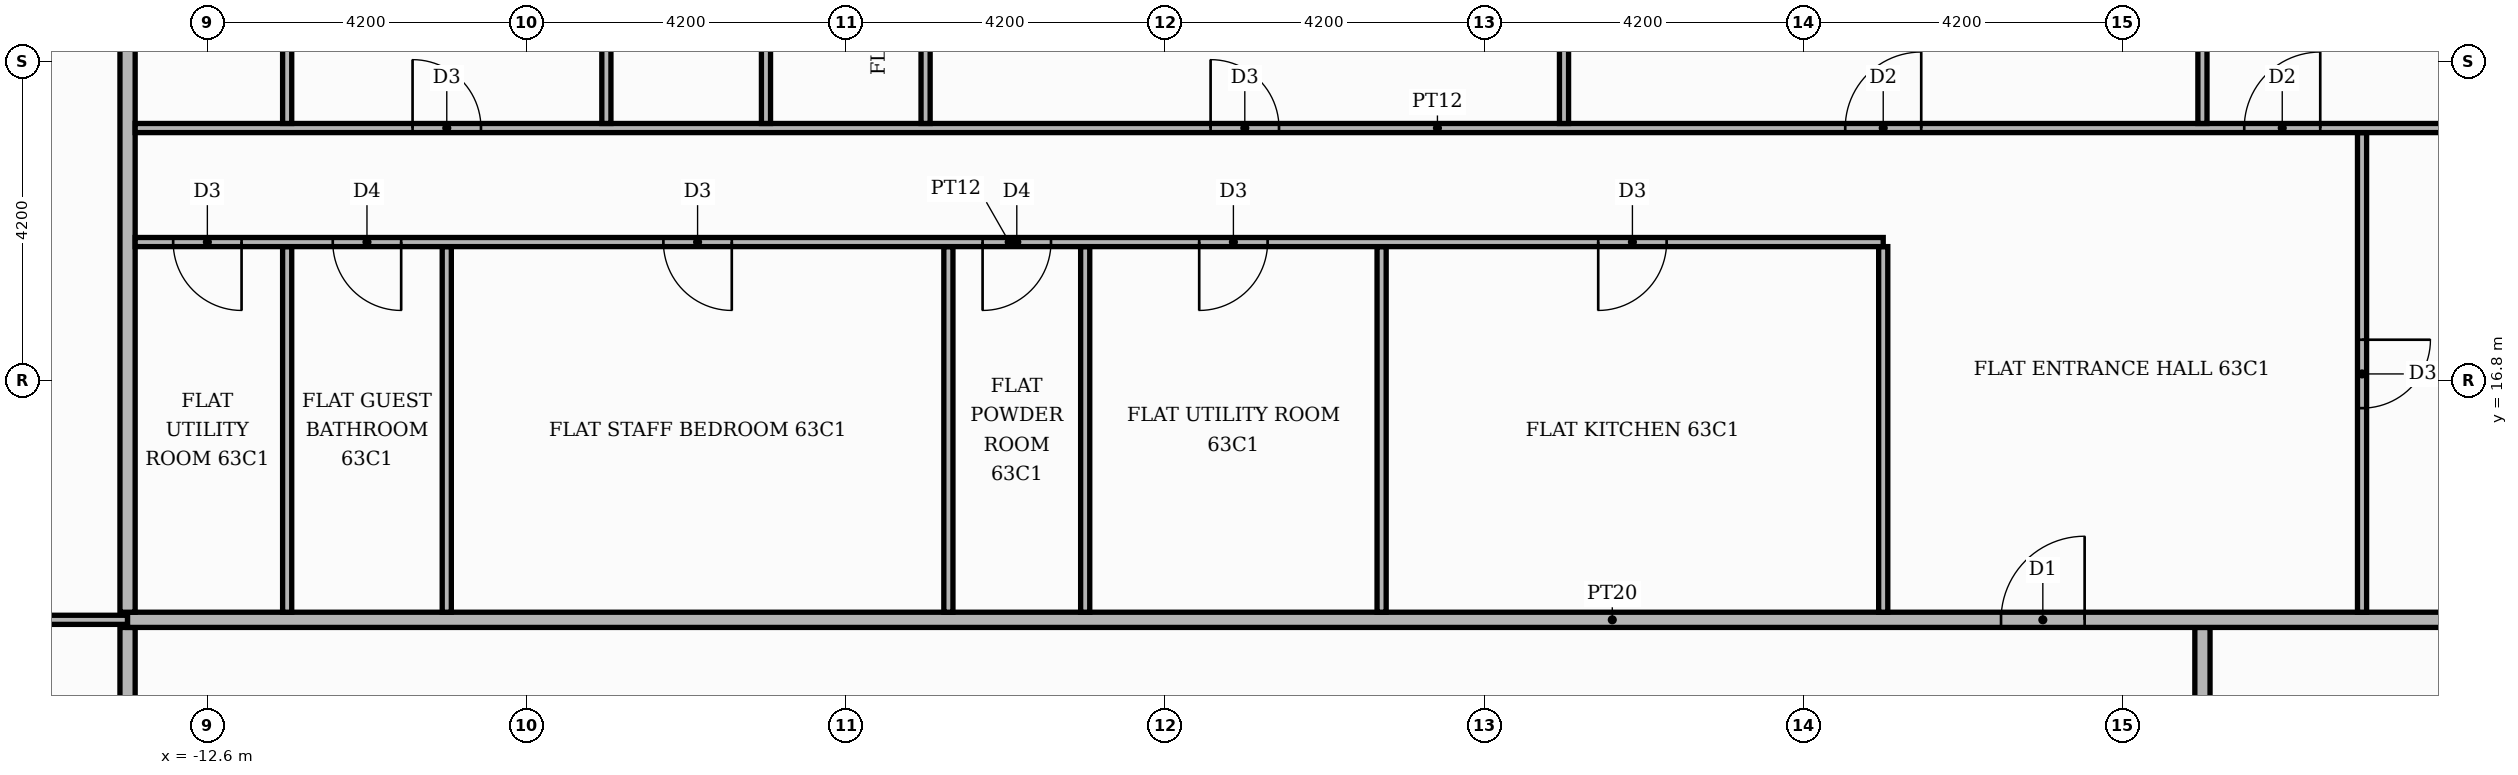
"""IFC4 building model, lengths in metres.
Left out: names, types, materials, properties, quantities, classifications, styles, units other than length and angle.
Written with IfcOpenShell. Run it as: python <this file> out.ifc"""

import sys

from ifc_helpers import new_model, si_unit, direction, frame, frame_2d, origin, place, context, subcontext, project, spatial, rectangle, extrude, element, fill, save


model = new_model("IFC4")
c1 = context("Model", 3, precision=1e-05, world=origin(), true_north=direction((0.0, 1.0)))
c2 = subcontext(c1, "Body", "Model", "MODEL_VIEW")
j1 = project(units=[si_unit("LENGTHUNIT", "METRE"), si_unit("PLANEANGLEUNIT", "RADIAN")], contexts=[c1])
p1 = place(None, origin())
s1 = spatial("IfcSite", under=j1, at=p1, CompositionType="ELEMENT")
p2 = place(p1, origin())
s2 = spatial("IfcBuilding", under=s1, at=p2, CompositionType="ELEMENT")
p3 = place(p2, frame((0.0, 0.0, 264.0)))
s3 = spatial("IfcBuildingStorey", under=s2, at=p3, CompositionType="ELEMENT", Elevation=264.0)
for number, where, z_axis, x_axis in (
    (1, (-13.65, 11.1, 0.0), (0.0, 0.0, 1.0), (0.0, 1.0, 0.0)),
    (2, (13.65, 11.1, 0.0), (0.0, 0.0, 1.0), (0.0, 1.0, 0.0)),
):
    element("IfcWall", number, at=place(p3, frame(where, z_axis=z_axis, x_axis=x_axis)), inside=s3, PredefinedType="PARTITIONING", context=c2, shape_type="SweptSolid", body=[
        extrude(rectangle(XDim=2.45, YDim=0.2, at=frame_2d((1.225, 0.0))), origin(), (0.0, 0.0, 1.0), 3.48),
    ])
p4 = place(p3, frame((-20.42, 13.65, 0.0), z_axis=(0.0, 0.0, 1.0), x_axis=(1.0, 0.0, 0.0)))
e3 = element("IfcWall", 3, at=p4, inside=s3, PredefinedType="PARTITIONING", context=c2, shape_type="SweptSolid", body=[
    extrude(rectangle(XDim=6.77, YDim=0.12, at=frame_2d((3.385, 0.0))), origin(), (0.0, 0.0, 1.0), 3.48),
])
p5 = place(p4, frame((2.885, 0.0, 0.0)))
e4 = element("IfcOpeningElement", 4, at=p5, cuts=e3, PredefinedType="OPENING", context=c2, shape_type="SweptSolid", body=[
    extrude(rectangle(XDim=1.0, YDim=2.1, at=frame_2d((0.5, 1.05))), frame((0.0, 0.07, 0.0), z_axis=(0.0, -1.0, 0.0), x_axis=(1.0, 0.0, 0.0)), (0.0, 0.0, 1.0), 0.14),
])
p6 = place(p3, frame((-13.65, 13.65, 0.0), z_axis=(0.0, 0.0, 1.0), x_axis=(1.0, 0.0, 0.0)))
e5 = element("IfcWall", 5, at=p6, inside=s3, PredefinedType="PARTITIONING", context=c2, shape_type="SweptSolid", body=[
    extrude(rectangle(XDim=39.07, YDim=0.2, at=frame_2d((19.535, 0.0))), origin(), (0.0, 0.0, 1.0), 3.48),
])
p7 = place(p6, frame((24.65, 0.0, 0.0)))
e6 = element("IfcOpeningElement", 6, at=p7, cuts=e5, PredefinedType="OPENING", context=c2, shape_type="SweptSolid", body=[
    extrude(rectangle(XDim=1.1, YDim=2.4, at=frame_2d((0.55, 1.2))), frame((0.0, 0.11, 0.0), z_axis=(0.0, -1.0, 0.0), x_axis=(1.0, 0.0, 0.0)), (0.0, 0.0, 1.0), 0.22),
])
p8 = place(p3, frame((-13.65, 13.75, 0.0), z_axis=(0.0, 0.0, 1.0), x_axis=(0.0, 1.0, 0.0)))
e7 = element("IfcWall", 7, at=p8, inside=s3, PredefinedType="PARTITIONING", context=c2, shape_type="SweptSolid", body=[
    extrude(rectangle(XDim=11.67, YDim=0.2, at=frame_2d((5.835, 0.0))), origin(), (0.0, 0.0, 1.0), 3.48),
])
for number, where, z_axis, x_axis in (
    (8, (-11.55, 13.75, 0.0), (0.0, 0.0, 1.0), (0.0, 1.0, 0.0)),
    (9, (-9.45, 13.75, 0.0), (0.0, 0.0, 1.0), (0.0, 1.0, 0.0)),
    (10, (-2.85, 13.75, 0.0), (0.0, 0.0, 1.0), (0.0, 1.0, 0.0)),
    (11, (-1.05, 13.75, 0.0), (0.0, 0.0, 1.0), (0.0, 1.0, 0.0)),
    (12, (2.85, 13.75, 0.0), (0.0, 0.0, 1.0), (0.0, 1.0, 0.0)),
    (13, (9.45, 13.75, 0.0), (0.0, 0.0, 1.0), (0.0, 1.0, 0.0)),
):
    element("IfcWall", number, at=place(p3, frame(where, z_axis=z_axis, x_axis=x_axis)), inside=s3, PredefinedType="PARTITIONING", context=c2, shape_type="SweptSolid", body=[
        extrude(rectangle(XDim=4.81, YDim=0.12, at=frame_2d((2.405, 0.0))), origin(), (0.0, 0.0, 1.0), 3.48),
    ])
p9 = place(p3, frame((15.75, 13.75, 0.0), z_axis=(0.0, 0.0, 1.0), x_axis=(0.0, 1.0, 0.0)))
e14 = element("IfcWall", 14, at=p9, inside=s3, PredefinedType="PARTITIONING", context=c2, shape_type="SweptSolid", body=[
    extrude(rectangle(XDim=6.31, YDim=0.12, at=frame_2d((3.155, 0.0))), origin(), (0.0, 0.0, 1.0), 3.48),
])
p10 = place(p9, frame((2.685, 0.0, 0.0)))
e15 = element("IfcOpeningElement", 15, at=p10, cuts=e14, PredefinedType="OPENING", context=c2, shape_type="SweptSolid", body=[
    extrude(rectangle(XDim=0.9, YDim=2.1, at=frame_2d((0.45, 1.05))), frame((0.0, 0.07, 0.0), z_axis=(0.0, -1.0, 0.0), x_axis=(1.0, 0.0, 0.0)), (0.0, 0.0, 1.0), 0.14),
])
p11 = place(p3, frame((-13.55, 18.62, 0.0), z_axis=(0.0, 0.0, 1.0), x_axis=(1.0, 0.0, 0.0)))
e16 = element("IfcWall", 16, at=p11, inside=s3, PredefinedType="PARTITIONING", context=c2, shape_type="SweptSolid", body=[
    extrude(rectangle(XDim=23.0, YDim=0.12, at=frame_2d((11.5, 0.0))), origin(), (0.0, 0.0, 1.0), 3.48),
])
p12 = place(p11, frame((19.25, 0.0, 0.0)))
e17 = element("IfcOpeningElement", 17, at=p12, cuts=e16, PredefinedType="OPENING", context=c2, shape_type="SweptSolid", body=[
    extrude(rectangle(XDim=0.9, YDim=2.1, at=frame_2d((0.45, 1.05))), frame((0.0, 0.07, 0.0), z_axis=(0.0, -1.0, 0.0), x_axis=(1.0, 0.0, 0.0)), (0.0, 0.0, 1.0), 0.14),
])
p13 = place(p11, frame((14.0, 0.0, 0.0)))
e18 = element("IfcOpeningElement", 18, at=p13, cuts=e16, PredefinedType="OPENING", context=c2, shape_type="SweptSolid", body=[
    extrude(rectangle(XDim=0.9, YDim=2.1, at=frame_2d((0.45, 1.05))), frame((0.0, 0.07, 0.0), z_axis=(0.0, -1.0, 0.0), x_axis=(1.0, 0.0, 0.0)), (0.0, 0.0, 1.0), 0.14),
])
p14 = place(p11, frame((11.15, 0.0, 0.0)))
e19 = element("IfcOpeningElement", 19, at=p14, cuts=e16, PredefinedType="OPENING", context=c2, shape_type="SweptSolid", body=[
    extrude(rectangle(XDim=0.9, YDim=2.1, at=frame_2d((0.45, 1.05))), frame((0.0, 0.07, 0.0), z_axis=(0.0, -1.0, 0.0), x_axis=(1.0, 0.0, 0.0)), (0.0, 0.0, 1.0), 0.14),
])
p15 = place(p11, frame((6.95, 0.0, 0.0)))
e20 = element("IfcOpeningElement", 20, at=p15, cuts=e16, PredefinedType="OPENING", context=c2, shape_type="SweptSolid", body=[
    extrude(rectangle(XDim=0.9, YDim=2.1, at=frame_2d((0.45, 1.05))), frame((0.0, 0.07, 0.0), z_axis=(0.0, -1.0, 0.0), x_axis=(1.0, 0.0, 0.0)), (0.0, 0.0, 1.0), 0.14),
])
p16 = place(p11, frame((2.6, 0.0, 0.0)))
e21 = element("IfcOpeningElement", 21, at=p16, cuts=e16, PredefinedType="OPENING", context=c2, shape_type="SweptSolid", body=[
    extrude(rectangle(XDim=0.9, YDim=2.1, at=frame_2d((0.45, 1.05))), frame((0.0, 0.07, 0.0), z_axis=(0.0, -1.0, 0.0), x_axis=(1.0, 0.0, 0.0)), (0.0, 0.0, 1.0), 0.14),
])
p17 = place(p11, frame((0.5, 0.0, 0.0)))
e22 = element("IfcOpeningElement", 22, at=p17, cuts=e16, PredefinedType="OPENING", context=c2, shape_type="SweptSolid", body=[
    extrude(rectangle(XDim=0.9, YDim=2.1, at=frame_2d((0.45, 1.05))), frame((0.0, 0.07, 0.0), z_axis=(0.0, -1.0, 0.0), x_axis=(1.0, 0.0, 0.0)), (0.0, 0.0, 1.0), 0.14),
])
p18 = place(p3, frame((-13.55, 20.12, 0.0), z_axis=(0.0, 0.0, 1.0), x_axis=(1.0, 0.0, 0.0)))
e23 = element("IfcWall", 23, at=p18, inside=s3, PredefinedType="PARTITIONING", context=c2, shape_type="SweptSolid", body=[
    extrude(rectangle(XDim=34.269, YDim=0.12, at=frame_2d((17.135, 0.0))), origin(), (0.0, 0.0, 1.0), 3.48),
])
p19 = place(p18, frame((27.75, 0.0, 0.0)))
e24 = element("IfcOpeningElement", 24, at=p19, cuts=e23, PredefinedType="OPENING", context=c2, shape_type="SweptSolid", body=[
    extrude(rectangle(XDim=1.0, YDim=2.1, at=frame_2d((0.5, 1.05))), frame((0.0, 0.07, 0.0), z_axis=(0.0, -1.0, 0.0), x_axis=(1.0, 0.0, 0.0)), (0.0, 0.0, 1.0), 0.14),
])
p20 = place(p18, frame((22.5, 0.0, 0.0)))
e25 = element("IfcOpeningElement", 25, at=p20, cuts=e23, PredefinedType="OPENING", context=c2, shape_type="SweptSolid", body=[
    extrude(rectangle(XDim=1.0, YDim=2.1, at=frame_2d((0.5, 1.05))), frame((0.0, 0.07, 0.0), z_axis=(0.0, -1.0, 0.0), x_axis=(1.0, 0.0, 0.0)), (0.0, 0.0, 1.0), 0.14),
])
p21 = place(p18, frame((14.15, 0.0, 0.0)))
e26 = element("IfcOpeningElement", 26, at=p21, cuts=e23, PredefinedType="OPENING", context=c2, shape_type="SweptSolid", body=[
    extrude(rectangle(XDim=0.9, YDim=2.1, at=frame_2d((0.45, 1.05))), frame((0.0, 0.07, 0.0), z_axis=(0.0, -1.0, 0.0), x_axis=(1.0, 0.0, 0.0)), (0.0, 0.0, 1.0), 0.14),
])
p22 = place(p18, frame((3.65, 0.0, 0.0)))
e27 = element("IfcOpeningElement", 27, at=p22, cuts=e23, PredefinedType="OPENING", context=c2, shape_type="SweptSolid", body=[
    extrude(rectangle(XDim=0.9, YDim=2.1, at=frame_2d((0.45, 1.05))), frame((0.0, 0.07, 0.0), z_axis=(0.0, -1.0, 0.0), x_axis=(1.0, 0.0, 0.0)), (0.0, 0.0, 1.0), 0.14),
])
p23 = place(p3, frame((-11.55, 20.18, 0.0), z_axis=(0.0, 0.0, 1.0), x_axis=(0.0, 1.0, 0.0)))
e28 = element("IfcWall", 28, at=p23, inside=s3, PredefinedType="PARTITIONING", context=c2, shape_type="SweptSolid", body=[
    extrude(rectangle(XDim=5.24, YDim=0.12, at=frame_2d((2.62, 0.0))), origin(), (0.0, 0.0, 1.0), 3.48),
])
p24 = place(p23, frame((2.29, 0.0, 0.0)))
e29 = element("IfcOpeningElement", 29, at=p24, cuts=e28, PredefinedType="OPENING", context=c2, shape_type="SweptSolid", body=[
    extrude(rectangle(XDim=0.9, YDim=2.1, at=frame_2d((0.45, 1.05))), frame((0.0, 0.07, 0.0), z_axis=(0.0, -1.0, 0.0), x_axis=(1.0, 0.0, 0.0)), (0.0, 0.0, 1.0), 0.14),
])
p25 = place(p3, frame((-7.35, 20.18, 0.0), z_axis=(0.0, 0.0, 1.0), x_axis=(0.0, 1.0, 0.0)))
e30 = element("IfcWall", 30, at=p25, inside=s3, PredefinedType="PARTITIONING", context=c2, shape_type="SweptSolid", body=[
    extrude(rectangle(XDim=5.24, YDim=0.12, at=frame_2d((2.62, 0.0))), origin(), (0.0, 0.0, 1.0), 3.48),
])
p26 = place(p3, frame((-5.25, 20.18, 0.0), z_axis=(0.0, 0.0, 1.0), x_axis=(0.0, 1.0, 0.0)))
e31 = element("IfcWall", 31, at=p26, inside=s3, PredefinedType="PARTITIONING", context=c2, shape_type="SweptSolid", body=[
    extrude(rectangle(XDim=5.24, YDim=0.12, at=frame_2d((2.62, 0.0))), origin(), (0.0, 0.0, 1.0), 3.48),
])
p27 = place(p26, frame((2.29, 0.0, 0.0)))
e32 = element("IfcOpeningElement", 32, at=p27, cuts=e31, PredefinedType="OPENING", context=c2, shape_type="SweptSolid", body=[
    extrude(rectangle(XDim=0.9, YDim=2.1, at=frame_2d((0.45, 1.05))), frame((0.0, 0.07, 0.0), z_axis=(0.0, -1.0, 0.0), x_axis=(1.0, 0.0, 0.0)), (0.0, 0.0, 1.0), 0.14),
])
p28 = place(p3, frame((-3.15, 20.18, 0.0), z_axis=(0.0, 0.0, 1.0), x_axis=(0.0, 1.0, 0.0)))
e33 = element("IfcWall", 33, at=p28, inside=s3, PredefinedType="PARTITIONING", context=c2, shape_type="SweptSolid", body=[
    extrude(rectangle(XDim=5.24, YDim=0.12, at=frame_2d((2.62, 0.0))), origin(), (0.0, 0.0, 1.0), 3.48),
])
p29 = place(p28, frame((2.29, 0.0, 0.0)))
e34 = element("IfcOpeningElement", 34, at=p29, cuts=e33, PredefinedType="OPENING", context=c2, shape_type="SweptSolid", body=[
    extrude(rectangle(XDim=0.9, YDim=2.1, at=frame_2d((0.45, 1.05))), frame((0.0, 0.07, 0.0), z_axis=(0.0, -1.0, 0.0), x_axis=(1.0, 0.0, 0.0)), (0.0, 0.0, 1.0), 0.14),
])
for number, where, z_axis, x_axis in (
    (35, (5.25, 20.18, 0.0), (0.0, 0.0, 1.0), (0.0, 1.0, 0.0)),
    (36, (13.65, 20.18, 0.0), (0.0, 0.0, 1.0), (0.0, 1.0, 0.0)),
):
    element("IfcWall", number, at=place(p3, frame(where, z_axis=z_axis, x_axis=x_axis)), inside=s3, PredefinedType="PARTITIONING", context=c2, shape_type="SweptSolid", body=[
        extrude(rectangle(XDim=5.24, YDim=0.12, at=frame_2d((2.62, 0.0))), origin(), (0.0, 0.0, 1.0), 3.48),
    ])
p30 = place(p7, origin())
e37 = element("IfcDoor", 37, at=p30, inside=s3, OperationType="SINGLE_SWING_RIGHT", PredefinedType="DOOR", context=c2, shape_type="SweptSolid", body=[
    extrude(rectangle(XDim=1.1, YDim=2.4, at=frame_2d((0.55, 1.2))), frame((0.0, 0.025, 0.0), z_axis=(0.0, -1.0, 0.0), x_axis=(1.0, 0.0, 0.0)), (0.0, 0.0, 1.0), 0.05),
])
fill(e6, e37)
p31 = place(p10, frame((0.9, 0.0, 0.0), z_axis=(0.0, 0.0, 1.0), x_axis=(-1.0, 0.0, 0.0)))
e38 = element("IfcDoor", 38, at=p31, inside=s3, OperationType="SINGLE_SWING_RIGHT", PredefinedType="DOOR", context=c2, shape_type="SweptSolid", body=[
    extrude(rectangle(XDim=0.9, YDim=2.1, at=frame_2d((0.45, 1.05))), frame((0.0, 0.025, 0.0), z_axis=(0.0, -1.0, 0.0), x_axis=(1.0, 0.0, 0.0)), (0.0, 0.0, 1.0), 0.05),
])
fill(e15, e38)
p32 = place(p12, frame((0.9, 0.0, 0.0), z_axis=(0.0, 0.0, 1.0), x_axis=(-1.0, 0.0, 0.0)))
e39 = element("IfcDoor", 39, at=p32, inside=s3, OperationType="SINGLE_SWING_LEFT", PredefinedType="DOOR", context=c2, shape_type="SweptSolid", body=[
    extrude(rectangle(XDim=0.9, YDim=2.1, at=frame_2d((0.45, 1.05))), frame((0.0, 0.025, 0.0), z_axis=(0.0, -1.0, 0.0), x_axis=(1.0, 0.0, 0.0)), (0.0, 0.0, 1.0), 0.05),
])
fill(e17, e39)
p33 = place(p13, frame((0.9, 0.0, 0.0), z_axis=(0.0, 0.0, 1.0), x_axis=(-1.0, 0.0, 0.0)))
e40 = element("IfcDoor", 40, at=p33, inside=s3, OperationType="SINGLE_SWING_LEFT", PredefinedType="DOOR", context=c2, shape_type="SweptSolid", body=[
    extrude(rectangle(XDim=0.9, YDim=2.1, at=frame_2d((0.45, 1.05))), frame((0.0, 0.025, 0.0), z_axis=(0.0, -1.0, 0.0), x_axis=(1.0, 0.0, 0.0)), (0.0, 0.0, 1.0), 0.05),
])
fill(e18, e40)
p34 = place(p14, frame((0.9, 0.0, 0.0), z_axis=(0.0, 0.0, 1.0), x_axis=(-1.0, 0.0, 0.0)))
e41 = element("IfcDoor", 41, at=p34, inside=s3, OperationType="SINGLE_SWING_LEFT", PredefinedType="DOOR", context=c2, shape_type="SweptSolid", body=[
    extrude(rectangle(XDim=0.9, YDim=2.1, at=frame_2d((0.45, 1.05))), frame((0.0, 0.025, 0.0), z_axis=(0.0, -1.0, 0.0), x_axis=(1.0, 0.0, 0.0)), (0.0, 0.0, 1.0), 0.05),
])
fill(e19, e41)
p35 = place(p15, frame((0.9, 0.0, 0.0), z_axis=(0.0, 0.0, 1.0), x_axis=(-1.0, 0.0, 0.0)))
e42 = element("IfcDoor", 42, at=p35, inside=s3, OperationType="SINGLE_SWING_RIGHT", PredefinedType="DOOR", context=c2, shape_type="SweptSolid", body=[
    extrude(rectangle(XDim=0.9, YDim=2.1, at=frame_2d((0.45, 1.05))), frame((0.0, 0.025, 0.0), z_axis=(0.0, -1.0, 0.0), x_axis=(1.0, 0.0, 0.0)), (0.0, 0.0, 1.0), 0.05),
])
fill(e20, e42)
p36 = place(p16, frame((0.9, 0.0, 0.0), z_axis=(0.0, 0.0, 1.0), x_axis=(-1.0, 0.0, 0.0)))
e43 = element("IfcDoor", 43, at=p36, inside=s3, OperationType="SINGLE_SWING_RIGHT", PredefinedType="DOOR", context=c2, shape_type="SweptSolid", body=[
    extrude(rectangle(XDim=0.9, YDim=2.1, at=frame_2d((0.45, 1.05))), frame((0.0, 0.025, 0.0), z_axis=(0.0, -1.0, 0.0), x_axis=(1.0, 0.0, 0.0)), (0.0, 0.0, 1.0), 0.05),
])
fill(e21, e43)
p37 = place(p17, frame((0.9, 0.0, 0.0), z_axis=(0.0, 0.0, 1.0), x_axis=(-1.0, 0.0, 0.0)))
e44 = element("IfcDoor", 44, at=p37, inside=s3, OperationType="SINGLE_SWING_RIGHT", PredefinedType="DOOR", context=c2, shape_type="SweptSolid", body=[
    extrude(rectangle(XDim=0.9, YDim=2.1, at=frame_2d((0.45, 1.05))), frame((0.0, 0.025, 0.0), z_axis=(0.0, -1.0, 0.0), x_axis=(1.0, 0.0, 0.0)), (0.0, 0.0, 1.0), 0.05),
])
fill(e22, e44)
p38 = place(p19, origin())
e45 = element("IfcDoor", 45, at=p38, inside=s3, OperationType="SINGLE_SWING_RIGHT", PredefinedType="DOOR", context=c2, shape_type="SweptSolid", body=[
    extrude(rectangle(XDim=1.0, YDim=2.1, at=frame_2d((0.5, 1.05))), frame((0.0, 0.025, 0.0), z_axis=(0.0, -1.0, 0.0), x_axis=(1.0, 0.0, 0.0)), (0.0, 0.0, 1.0), 0.05),
])
fill(e24, e45)
p39 = place(p20, origin())
e46 = element("IfcDoor", 46, at=p39, inside=s3, OperationType="SINGLE_SWING_RIGHT", PredefinedType="DOOR", context=c2, shape_type="SweptSolid", body=[
    extrude(rectangle(XDim=1.0, YDim=2.1, at=frame_2d((0.5, 1.05))), frame((0.0, 0.025, 0.0), z_axis=(0.0, -1.0, 0.0), x_axis=(1.0, 0.0, 0.0)), (0.0, 0.0, 1.0), 0.05),
])
fill(e25, e46)
p40 = place(p21, origin())
e47 = element("IfcDoor", 47, at=p40, inside=s3, OperationType="SINGLE_SWING_LEFT", PredefinedType="DOOR", context=c2, shape_type="SweptSolid", body=[
    extrude(rectangle(XDim=0.9, YDim=2.1, at=frame_2d((0.45, 1.05))), frame((0.0, 0.025, 0.0), z_axis=(0.0, -1.0, 0.0), x_axis=(1.0, 0.0, 0.0)), (0.0, 0.0, 1.0), 0.05),
])
fill(e26, e47)
p41 = place(p22, origin())
e48 = element("IfcDoor", 48, at=p41, inside=s3, OperationType="SINGLE_SWING_LEFT", PredefinedType="DOOR", context=c2, shape_type="SweptSolid", body=[
    extrude(rectangle(XDim=0.9, YDim=2.1, at=frame_2d((0.45, 1.05))), frame((0.0, 0.025, 0.0), z_axis=(0.0, -1.0, 0.0), x_axis=(1.0, 0.0, 0.0)), (0.0, 0.0, 1.0), 0.05),
])
fill(e27, e48)
save(model, sys.argv[1])
